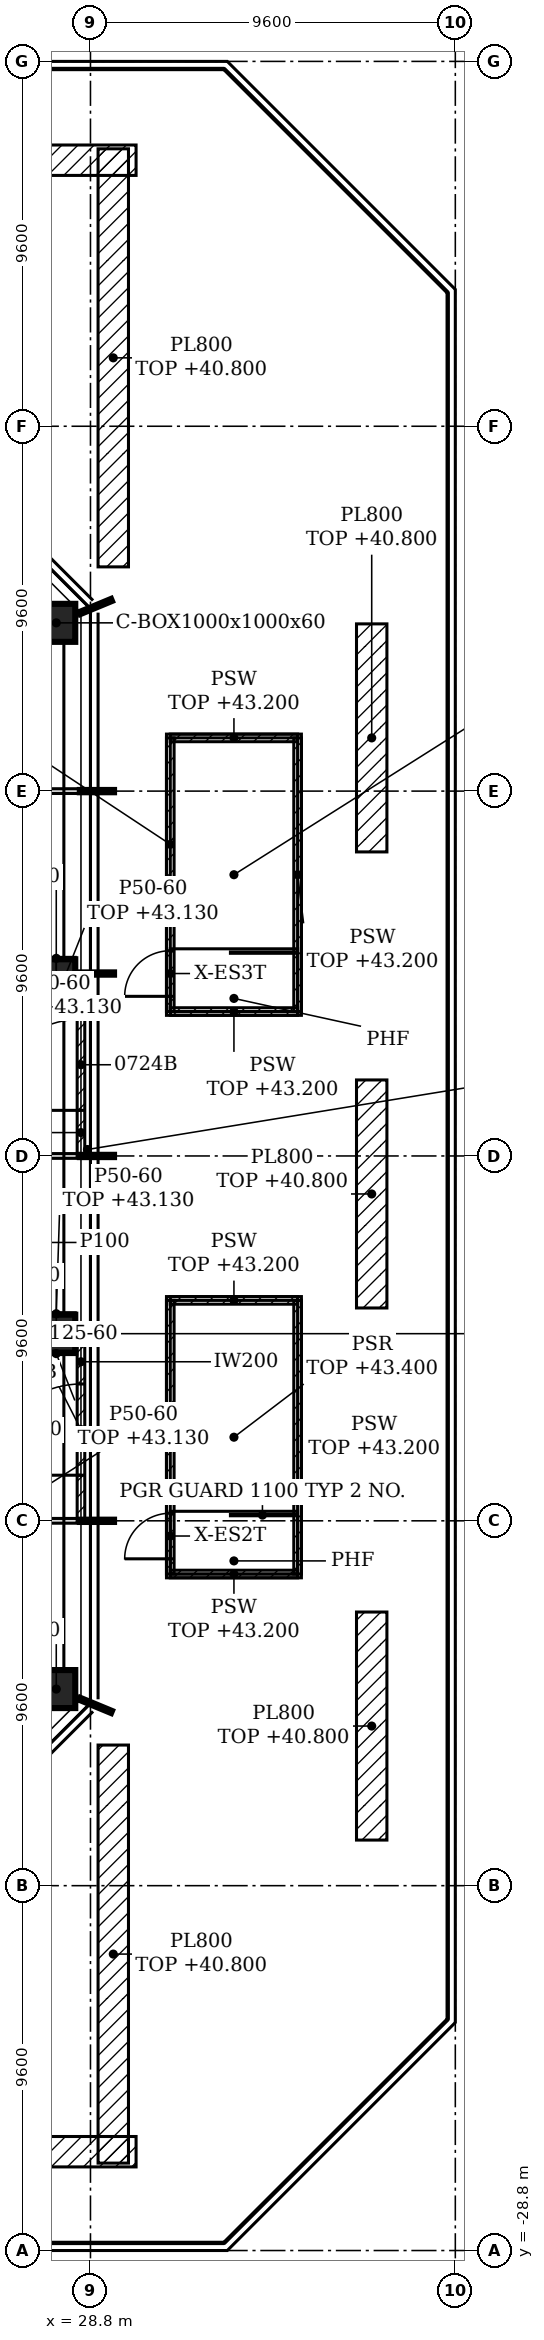
"""IFC4 building model, lengths in metres.
Left out: names, types, materials, properties, quantities, classifications, styles, units other than length and angle.
Written with IfcOpenShell. Run it as: python <this file> out.ifc"""

import sys

from ifc_helpers import new_model, si_unit, direction, frame, frame_2d, origin, origin_2d, place, context, subcontext, project, spatial, polyline, rectangle, hollow_rectangle, outline, extrude, element, fill, save


model = new_model("IFC4")
c1 = context("Model", 3, precision=1e-05, world=origin(), true_north=direction((0.0, 1.0)))
c2 = subcontext(c1, "Body", "Model", "MODEL_VIEW")
j1 = project(units=[si_unit("LENGTHUNIT", "METRE"), si_unit("PLANEANGLEUNIT", "RADIAN")], contexts=[c1])
p1 = place(None, origin())
s1 = spatial("IfcSite", under=j1, at=p1, CompositionType="ELEMENT")
p2 = place(p1, origin())
s2 = spatial("IfcBuilding", under=s1, at=p2, CompositionType="ELEMENT")
p3 = place(p2, frame((0.0, 0.0, 40.2)))
s3 = spatial("IfcBuildingStorey", under=s2, at=p3, CompositionType="ELEMENT", Elevation=40.2)
for number, where, z_axis, x_axis in (
    (1, (27.9, -14.027, -0.15), (0.0, 0.0, 1.0), (1.0, 0.0, 0.0)),
    (2, (27.9, -4.676, -0.15), (0.0, 0.0, 1.0), (1.0, 0.0, 0.0)),
    (3, (27.9, 4.676, -0.15), (0.0, 0.0, 1.0), (1.0, 0.0, 0.0)),
    (4, (27.9, 14.027, -0.15), (0.0, 0.0, 1.0), (1.0, 0.0, 0.0)),
):
    element("IfcColumn", number, at=place(p3, frame(where, z_axis=z_axis, x_axis=x_axis)), inside=s3, PredefinedType="COLUMN", context=c2, shape_type="SweptSolid", body=[
        extrude(hollow_rectangle(XDim=1.0, YDim=1.0, WallThickness=0.06, at=origin_2d()), origin(), (0.0, 0.0, 1.0), 3.6),
    ])
for number, where, z_axis, x_axis in (
    (5, (24.0, 26.2, 0.0), (0.0, 0.0, 1.0), (1.0, 0.0, 0.0)),
    (6, (24.0, -26.2, 0.0), (0.0, 0.0, 1.0), (1.0, 0.0, 0.0)),
    (7, (36.2, -18.0, 0.0), (0.0, 0.0, 1.0), (0.0, 1.0, 0.0)),
    (8, (36.2, -4.0, 0.0), (0.0, 0.0, 1.0), (0.0, 1.0, 0.0)),
    (9, (36.2, 8.0, 0.0), (0.0, 0.0, 1.0), (0.0, 1.0, 0.0)),
):
    element("IfcWall", number, at=place(p3, frame(where, z_axis=z_axis, x_axis=x_axis)), inside=s3, PredefinedType="NOTDEFINED", context=c2, shape_type="SweptSolid", body=[
        extrude(rectangle(XDim=6.0, YDim=0.8, at=frame_2d((3.0, 0.0))), origin(), (0.0, 0.0, 1.0), 0.6),
    ])
for number, where, z_axis, x_axis in (
    (10, (29.4, 15.5, 0.0), (0.0, 0.0, 1.0), (0.0, 1.0, 0.0)),
    (11, (29.4, -26.5, 0.0), (0.0, 0.0, 1.0), (0.0, 1.0, 0.0)),
):
    element("IfcWall", number, at=place(p3, frame(where, z_axis=z_axis, x_axis=x_axis)), inside=s3, PredefinedType="NOTDEFINED", context=c2, shape_type="SweptSolid", body=[
        extrude(rectangle(XDim=11.0, YDim=0.8, at=frame_2d((5.5, 0.0))), origin(), (0.0, 0.0, 1.0), 0.6),
    ])
p4 = place(p3, frame((30.9, -11.0, 0.0), z_axis=(0.0, 0.0, 1.0), x_axis=(0.0, 1.0, 0.0)))
e12 = element("IfcWall", 12, at=p4, inside=s3, PredefinedType="SOLIDWALL", context=c2, shape_type="SweptSolid", body=[
    extrude(rectangle(XDim=7.2, YDim=0.2, at=frame_2d((3.6, 0.0))), origin(), (0.0, 0.0, 1.0), 3.0),
])
p5 = place(p4, frame((0.4, 0.0, 0.0)))
e13 = element("IfcOpeningElement", 13, at=p5, cuts=e12, PredefinedType="OPENING", context=c2, shape_type="SweptSolid", body=[
    extrude(rectangle(XDim=1.2, YDim=2.1, at=frame_2d((0.6, 1.05))), frame((0.0, 0.11, 0.0), z_axis=(0.0, -1.0, 0.0), x_axis=(1.0, 0.0, 0.0)), (0.0, 0.0, 1.0), 0.22),
])
p6 = place(p3, frame((30.9, -3.8, 0.0), z_axis=(0.0, 0.0, 1.0), x_axis=(1.0, 0.0, 0.0)))
e14 = element("IfcWall", 14, at=p6, inside=s3, PredefinedType="SOLIDWALL", context=c2, shape_type="SweptSolid", body=[
    extrude(rectangle(XDim=3.35, YDim=0.2, at=frame_2d((1.675, 0.0))), origin(), (0.0, 0.0, 1.0), 3.0),
])
p7 = place(p3, frame((34.25, -3.8, 0.0), z_axis=(0.0, 0.0, 1.0), x_axis=(0.0, -1.0, 0.0)))
e15 = element("IfcWall", 15, at=p7, inside=s3, PredefinedType="SOLIDWALL", context=c2, shape_type="SweptSolid", body=[
    extrude(rectangle(XDim=7.2, YDim=0.2, at=frame_2d((3.6, 0.0))), origin(), (0.0, 0.0, 1.0), 3.0),
])
p8 = place(p3, frame((34.25, -11.0, 0.0), z_axis=(0.0, 0.0, 1.0), x_axis=(-1.0, 0.0, 0.0)))
e16 = element("IfcWall", 16, at=p8, inside=s3, PredefinedType="SOLIDWALL", context=c2, shape_type="SweptSolid", body=[
    extrude(rectangle(XDim=3.35, YDim=0.2, at=frame_2d((1.675, 0.0))), origin(), (0.0, 0.0, 1.0), 3.0),
])
p9 = place(p3, frame((30.9, 3.8, 0.0), z_axis=(0.0, 0.0, 1.0), x_axis=(0.0, 1.0, 0.0)))
e17 = element("IfcWall", 17, at=p9, inside=s3, PredefinedType="SOLIDWALL", context=c2, shape_type="SweptSolid", body=[
    extrude(rectangle(XDim=7.2, YDim=0.2, at=frame_2d((3.6, 0.0))), origin(), (0.0, 0.0, 1.0), 3.0),
])
p10 = place(p9, frame((0.4, 0.0, 0.0)))
e18 = element("IfcOpeningElement", 18, at=p10, cuts=e17, PredefinedType="OPENING", context=c2, shape_type="SweptSolid", body=[
    extrude(rectangle(XDim=1.2, YDim=2.1, at=frame_2d((0.6, 1.05))), frame((0.0, 0.11, 0.0), z_axis=(0.0, -1.0, 0.0), x_axis=(1.0, 0.0, 0.0)), (0.0, 0.0, 1.0), 0.22),
])
p11 = place(p3, frame((30.9, 11.0, 0.0), z_axis=(0.0, 0.0, 1.0), x_axis=(1.0, 0.0, 0.0)))
e19 = element("IfcWall", 19, at=p11, inside=s3, PredefinedType="SOLIDWALL", context=c2, shape_type="SweptSolid", body=[
    extrude(rectangle(XDim=3.35, YDim=0.2, at=frame_2d((1.675, 0.0))), origin(), (0.0, 0.0, 1.0), 3.0),
])
p12 = place(p3, frame((34.25, 11.0, 0.0), z_axis=(0.0, 0.0, 1.0), x_axis=(0.0, -1.0, 0.0)))
e20 = element("IfcWall", 20, at=p12, inside=s3, PredefinedType="SOLIDWALL", context=c2, shape_type="SweptSolid", body=[
    extrude(rectangle(XDim=7.2, YDim=0.2, at=frame_2d((3.6, 0.0))), origin(), (0.0, 0.0, 1.0), 3.0),
])
p13 = place(p3, frame((34.25, 3.8, 0.0), z_axis=(0.0, 0.0, 1.0), x_axis=(-1.0, 0.0, 0.0)))
e21 = element("IfcWall", 21, at=p13, inside=s3, PredefinedType="SOLIDWALL", context=c2, shape_type="SweptSolid", body=[
    extrude(rectangle(XDim=3.35, YDim=0.2, at=frame_2d((1.675, 0.0))), origin(), (0.0, 0.0, 1.0), 3.0),
])
p14 = place(p3, frame((28.55, -9.57, 0.0), z_axis=(0.0, 0.0, 1.0), x_axis=(0.0, 1.0, 0.0)))
e22 = element("IfcWall", 22, at=p14, inside=s3, PredefinedType="NOTDEFINED", context=c2, shape_type="SweptSolid", body=[
    extrude(rectangle(XDim=4.74, YDim=0.2, at=frame_2d((2.37, 0.0))), origin(), (0.0, 0.0, 1.0), 3.45),
])
p15 = place(p14, frame((1.17, 0.0, 0.0)))
e23 = element("IfcOpeningElement", 23, at=p15, cuts=e22, PredefinedType="OPENING", context=c2, shape_type="SweptSolid", body=[
    extrude(rectangle(XDim=2.4, YDim=2.4, at=frame_2d((1.2, 1.2))), frame((0.0, 0.11, 0.0), z_axis=(0.0, -1.0, 0.0), x_axis=(1.0, 0.0, 0.0)), (0.0, 0.0, 1.0), 0.22),
])
p16 = place(p3, frame((28.55, 0.03, 0.0), z_axis=(0.0, 0.0, 1.0), x_axis=(0.0, 1.0, 0.0)))
e24 = element("IfcWall", 24, at=p16, inside=s3, PredefinedType="NOTDEFINED", context=c2, shape_type="SweptSolid", body=[
    extrude(rectangle(XDim=4.74, YDim=0.2, at=frame_2d((2.37, 0.0))), origin(), (0.0, 0.0, 1.0), 3.45),
])
p17 = place(p16, frame((1.17, 0.0, 0.0)))
e25 = element("IfcOpeningElement", 25, at=p17, cuts=e24, PredefinedType="OPENING", context=c2, shape_type="SweptSolid", body=[
    extrude(rectangle(XDim=2.4, YDim=2.4, at=frame_2d((1.2, 1.2))), frame((0.0, 0.11, 0.0), z_axis=(0.0, -1.0, 0.0), x_axis=(1.0, 0.0, 0.0)), (0.0, 0.0, 1.0), 0.22),
])
p18 = place(p3, frame((19.262, -9.6, 0.0), z_axis=(0.0, 0.0, 1.0), x_axis=(1.0, 0.0, 0.0)))
e26 = element("IfcWall", 26, at=p18, inside=s3, PredefinedType="PARTITIONING", context=c2, shape_type="SweptSolid", body=[
    extrude(outline(polyline([(0.0, 0.0), (9.188, 0.0), (9.188, 2.98), (8.788, 2.98), (8.785, 2.93), (8.488, 2.93), (8.486, 2.98), (0.087, 2.98), (0.085, 2.73), (0.0, 2.73), (0.0, 0.0)])), frame((0.0, 0.062, 0.0), z_axis=(0.0, -1.0, 0.0), x_axis=(1.0, 0.0, 0.0)), (0.0, 0.0, 1.0), 0.125),
])
p19 = place(p3, frame((28.4, -4.676, 0.0), z_axis=(0.0, 0.0, 1.0), x_axis=(1.0, 0.0, 0.0)))
e27 = element("IfcWall", 27, at=p19, inside=s3, PredefinedType="PARTITIONING", context=c2, shape_type="SweptSolid", body=[
    extrude(rectangle(XDim=0.103, YDim=0.125, at=frame_2d((0.052, 0.0))), origin(), (0.0, 0.0, 1.0), 3.45),
])
p20 = place(p3, frame((19.262, 0.0, 0.0), z_axis=(0.0, 0.0, 1.0), x_axis=(1.0, 0.0, 0.0)))
e28 = element("IfcWall", 28, at=p20, inside=s3, PredefinedType="PARTITIONING", context=c2, shape_type="SweptSolid", body=[
    extrude(outline(polyline([(0.0, 0.0), (9.188, 0.0), (9.188, 2.98), (8.788, 2.98), (8.785, 2.93), (8.488, 2.93), (8.486, 2.98), (0.087, 2.98), (0.085, 2.83), (0.0, 2.83), (0.0, 0.0)])), frame((0.0, 0.062, 0.0), z_axis=(0.0, -1.0, 0.0), x_axis=(1.0, 0.0, 0.0)), (0.0, 0.0, 1.0), 0.125),
])
p21 = place(p3, frame((19.262, 9.6, 0.0), z_axis=(0.0, 0.0, 1.0), x_axis=(1.0, 0.0, 0.0)))
e29 = element("IfcWall", 29, at=p21, inside=s3, PredefinedType="PARTITIONING", context=c2, shape_type="SweptSolid", body=[
    extrude(outline(polyline([(0.0, 0.0), (9.228, 0.0), (9.228, 2.98), (8.788, 2.98), (8.785, 2.93), (8.488, 2.93), (8.486, 2.98), (0.087, 2.98), (0.085, 2.83), (0.0, 2.83), (0.0, 0.0)])), frame((0.0, 0.062, 0.0), z_axis=(0.0, -1.0, 0.0), x_axis=(1.0, 0.0, 0.0)), (0.0, 0.0, 1.0), 0.125),
])
for number, where, z_axis, x_axis in (
    (30, (27.4, -4.151, 0.0), (0.0, 0.0, 1.0), (1.0, 0.0, 0.0)),
    (31, (27.4, -5.201, 0.0), (0.0, 0.0, 1.0), (1.0, 0.0, 0.0)),
    (32, (27.4, 5.201, 0.0), (0.0, 0.0, 1.0), (1.0, 0.0, 0.0)),
    (33, (27.4, 4.151, 0.0), (0.0, 0.0, 1.0), (1.0, 0.0, 0.0)),
):
    element("IfcWall", number, at=place(p3, frame(where, z_axis=z_axis, x_axis=x_axis)), inside=s3, PredefinedType="PARTITIONING", context=c2, shape_type="SweptSolid", body=[
        extrude(rectangle(XDim=1.0, YDim=0.05, at=frame_2d((0.5, 0.0))), origin(), (0.0, 0.0, 1.0), 2.93),
    ])
p22 = place(p5, origin())
e34 = element("IfcDoor", 34, at=p22, inside=s3, OperationType="SINGLE_SWING_LEFT", PredefinedType="DOOR", context=c2, shape_type="SweptSolid", body=[
    extrude(rectangle(XDim=1.2, YDim=2.1, at=frame_2d((0.6, 1.05))), frame((0.0, 0.025, 0.0), z_axis=(0.0, -1.0, 0.0), x_axis=(1.0, 0.0, 0.0)), (0.0, 0.0, 1.0), 0.05),
])
fill(e13, e34)
p23 = place(p10, origin())
e35 = element("IfcDoor", 35, at=p23, inside=s3, OperationType="SINGLE_SWING_LEFT", PredefinedType="DOOR", context=c2, shape_type="SweptSolid", body=[
    extrude(rectangle(XDim=1.2, YDim=2.1, at=frame_2d((0.6, 1.05))), frame((0.0, 0.025, 0.0), z_axis=(0.0, -1.0, 0.0), x_axis=(1.0, 0.0, 0.0)), (0.0, 0.0, 1.0), 0.05),
])
fill(e18, e35)
p24 = place(p15, origin())
e36 = element("IfcDoor", 36, at=p24, inside=s3, OperationType="SINGLE_SWING_LEFT", PredefinedType="DOOR", context=c2, shape_type="SweptSolid", body=[
    extrude(rectangle(XDim=2.4, YDim=2.4, at=frame_2d((1.2, 1.2))), frame((0.0, 0.025, 0.0), z_axis=(0.0, -1.0, 0.0), x_axis=(1.0, 0.0, 0.0)), (0.0, 0.0, 1.0), 0.05),
])
fill(e23, e36)
p25 = place(p17, origin())
e37 = element("IfcDoor", 37, at=p25, inside=s3, OperationType="SINGLE_SWING_LEFT", PredefinedType="DOOR", context=c2, shape_type="SweptSolid", body=[
    extrude(rectangle(XDim=2.4, YDim=2.4, at=frame_2d((1.2, 1.2))), frame((0.0, 0.025, 0.0), z_axis=(0.0, -1.0, 0.0), x_axis=(1.0, 0.0, 0.0)), (0.0, 0.0, 1.0), 0.05),
])
fill(e25, e37)
save(model, sys.argv[1])
